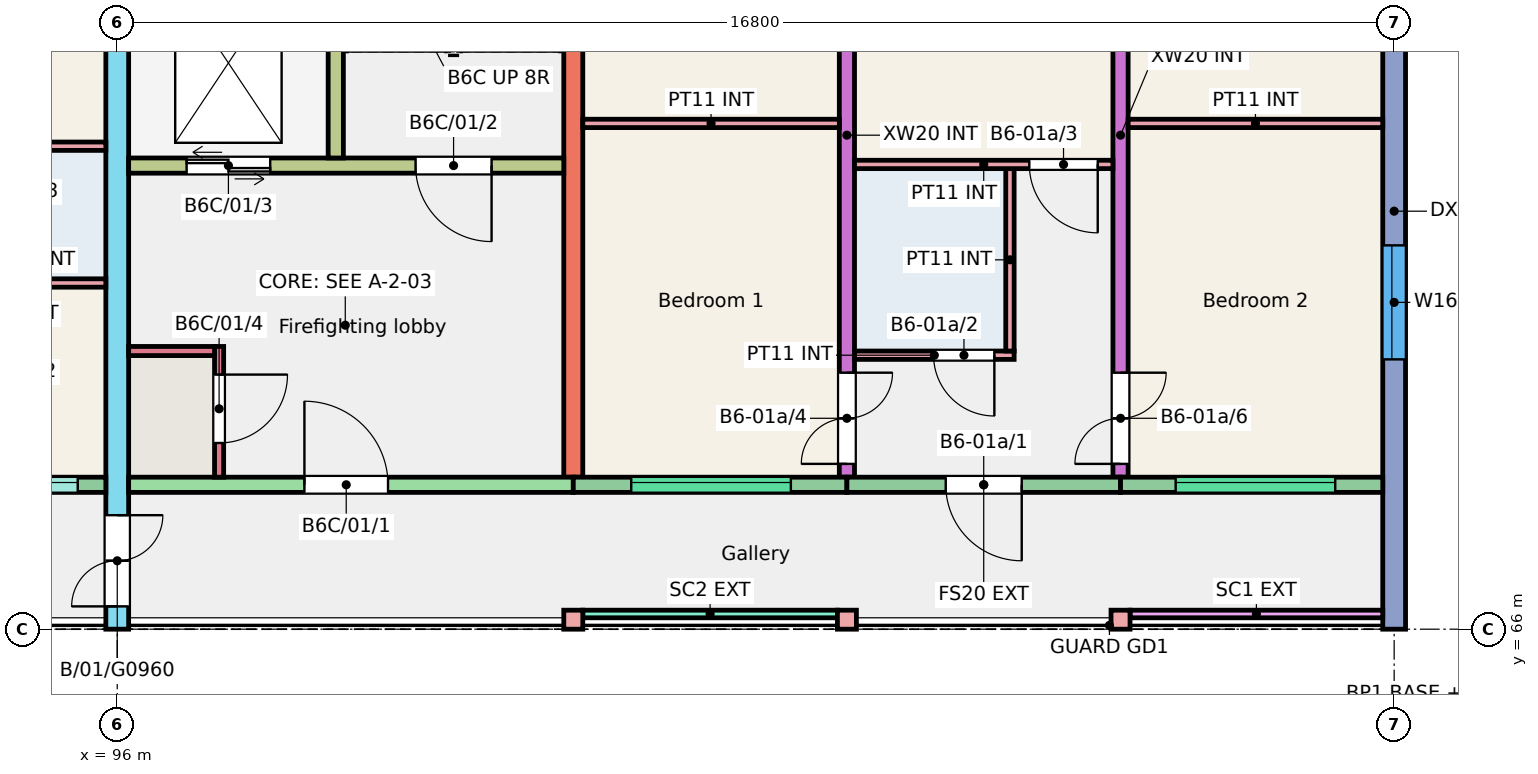
"""IFC4 building model, lengths in metres.
Left out: names, types, materials, properties, quantities, classifications, styles, units other than length and angle.
Written with IfcOpenShell. Run it as: python <this file> out.ifc"""

import sys

from ifc_helpers import new_model, si_unit, direction, frame, frame_2d, origin, origin_2d, place, context, subcontext, project, spatial, rectangle, extrude, element, fill, save


model = new_model("IFC4")
c1 = context("Model", 3, precision=1e-05, world=origin(), true_north=direction((0.0, 1.0)))
c2 = subcontext(c1, "Body", "Model", "MODEL_VIEW")
j1 = project(units=[si_unit("LENGTHUNIT", "METRE"), si_unit("PLANEANGLEUNIT", "RADIAN")], contexts=[c1])
p1 = place(None, origin())
s1 = spatial("IfcSite", under=j1, at=p1, CompositionType="ELEMENT")
p2 = place(p1, origin())
s2 = spatial("IfcBuilding", under=s1, at=p2, CompositionType="ELEMENT")
p3 = place(p2, frame((0.0, 0.0, 3.0)))
s3 = spatial("IfcBuildingStorey", under=s2, at=p3, CompositionType="ELEMENT", Elevation=3.0)
p4 = place(p3, frame((96.0, 66.0, 0.0), z_axis=(0.0, 0.0, 1.0), x_axis=(0.0, 1.0, 0.0)))
e1 = element("IfcWall", 1, at=p4, inside=s3, PredefinedType="SHEAR", context=c2, shape_type="SweptSolid", body=[
    extrude(rectangle(XDim=11.0, YDim=0.3, at=frame_2d((5.5, 0.0))), origin(), (0.0, 0.0, 1.0), 3.0),
])
p5 = place(p4, frame((0.3, 0.0, 0.0)))
e2 = element("IfcOpeningElement", 2, at=p5, cuts=e1, PredefinedType="OPENING", context=c2, shape_type="SweptSolid", body=[
    extrude(rectangle(XDim=1.2, YDim=2.1, at=frame_2d((0.6, 1.05))), frame((0.0, 0.16, 0.0), z_axis=(0.0, -1.0, 0.0), x_axis=(1.0, 0.0, 0.0)), (0.0, 0.0, 1.0), 0.32),
])
p6 = place(p3, frame((102.0, 68.0, 0.0), z_axis=(0.0, 0.0, 1.0), x_axis=(0.0, 1.0, 0.0)))
e3 = element("IfcWall", 3, at=p6, inside=s3, PredefinedType="SHEAR", context=c2, shape_type="SweptSolid", body=[
    extrude(rectangle(XDim=9.0, YDim=0.25, at=frame_2d((4.5, 0.0))), origin(), (0.0, 0.0, 1.0), 3.0),
])
p7 = place(p3, frame((105.6, 68.0, 0.0), z_axis=(0.0, 0.0, 1.0), x_axis=(0.0, 1.0, 0.0)))
e4 = element("IfcWall", 4, at=p7, inside=s3, PredefinedType="SHEAR", context=c2, shape_type="SweptSolid", body=[
    extrude(rectangle(XDim=9.0, YDim=0.2, at=frame_2d((4.5, 0.0))), origin(), (0.0, 0.0, 1.0), 3.0),
])
p8 = place(p7, frame((0.175, 0.0, 0.0)))
e5 = element("IfcOpeningElement", 5, at=p8, cuts=e4, PredefinedType="OPENING", context=c2, shape_type="SweptSolid", body=[
    extrude(rectangle(XDim=1.2, YDim=2.1, at=frame_2d((0.6, 1.05))), frame((0.0, 0.11, 0.0), z_axis=(0.0, -1.0, 0.0), x_axis=(1.0, 0.0, 0.0)), (0.0, 0.0, 1.0), 0.22),
])
p9 = place(p7, frame((6.4, 0.0, 0.0)))
e6 = element("IfcOpeningElement", 6, at=p9, cuts=e4, PredefinedType="OPENING", context=c2, shape_type="SweptSolid", body=[
    extrude(rectangle(XDim=1.2, YDim=2.1, at=frame_2d((0.6, 1.05))), frame((0.0, 0.11, 0.0), z_axis=(0.0, -1.0, 0.0), x_axis=(1.0, 0.0, 0.0)), (0.0, 0.0, 1.0), 0.22),
])
p10 = place(p3, frame((109.2, 68.0, 0.0), z_axis=(0.0, 0.0, 1.0), x_axis=(0.0, 1.0, 0.0)))
e7 = element("IfcWall", 7, at=p10, inside=s3, PredefinedType="SHEAR", context=c2, shape_type="SweptSolid", body=[
    extrude(rectangle(XDim=9.0, YDim=0.2, at=frame_2d((4.5, 0.0))), origin(), (0.0, 0.0, 1.0), 3.0),
])
p11 = place(p10, frame((0.175, 0.0, 0.0)))
e8 = element("IfcOpeningElement", 8, at=p11, cuts=e7, PredefinedType="OPENING", context=c2, shape_type="SweptSolid", body=[
    extrude(rectangle(XDim=1.2, YDim=2.1, at=frame_2d((0.6, 1.05))), frame((0.0, 0.11, 0.0), z_axis=(0.0, -1.0, 0.0), x_axis=(1.0, 0.0, 0.0)), (0.0, 0.0, 1.0), 0.22),
])
p12 = place(p10, frame((6.4, 0.0, 0.0)))
e9 = element("IfcOpeningElement", 9, at=p12, cuts=e7, PredefinedType="OPENING", context=c2, shape_type="SweptSolid", body=[
    extrude(rectangle(XDim=1.2, YDim=2.1, at=frame_2d((0.6, 1.05))), frame((0.0, 0.11, 0.0), z_axis=(0.0, -1.0, 0.0), x_axis=(1.0, 0.0, 0.0)), (0.0, 0.0, 1.0), 0.22),
])
p13 = place(p3, frame((112.8, 66.0, 0.0), z_axis=(0.0, 0.0, 1.0), x_axis=(0.0, 1.0, 0.0)))
e10 = element("IfcWall", 10, at=p13, inside=s3, PredefinedType="SHEAR", context=c2, shape_type="SweptSolid", body=[
    extrude(rectangle(XDim=11.0, YDim=0.3, at=frame_2d((5.5, 0.0))), origin(), (0.0, 0.0, 1.0), 3.0),
])
p14 = place(p13, frame((3.55, 0.0, 0.9)))
e11 = element("IfcOpeningElement", 11, at=p14, cuts=e10, PredefinedType="OPENING", context=c2, shape_type="SweptSolid", body=[
    extrude(rectangle(XDim=1.5, YDim=1.5, at=frame_2d((0.75, 0.75))), frame((0.0, 0.16, 0.0), z_axis=(0.0, -1.0, 0.0), x_axis=(1.0, 0.0, 0.0)), (0.0, 0.0, 1.0), 0.32),
])
p15 = place(p13, frame((8.105, 0.0, 0.9)))
e12 = element("IfcOpeningElement", 12, at=p15, cuts=e10, PredefinedType="OPENING", context=c2, shape_type="SweptSolid", body=[
    extrude(rectangle(XDim=1.5, YDim=1.5, at=frame_2d((0.75, 0.75))), frame((0.0, 0.16, 0.0), z_axis=(0.0, -1.0, 0.0), x_axis=(1.0, 0.0, 0.0)), (0.0, 0.0, 1.0), 0.32),
])
p16 = place(p3, frame((92.4, 67.9, 0.0), z_axis=(0.0, 0.0, 1.0), x_axis=(1.0, 0.0, 0.0)))
e13 = element("IfcWall", 13, at=p16, inside=s3, PredefinedType="SOLIDWALL", context=c2, shape_type="SweptSolid", body=[
    extrude(rectangle(XDim=3.45, YDim=0.2, at=frame_2d((1.725, 0.0))), origin(), (0.0, 0.0, 1.0), 3.0),
])
p17 = place(p16, frame((1.88, 0.0, 1.1)))
e14 = element("IfcOpeningElement", 14, at=p17, cuts=e13, PredefinedType="OPENING", context=c2, shape_type="SweptSolid", body=[
    extrude(rectangle(XDim=1.2, YDim=1.3, at=frame_2d((0.6, 0.65))), frame((0.0, 0.11, 0.0), z_axis=(0.0, -1.0, 0.0), x_axis=(1.0, 0.0, 0.0)), (0.0, 0.0, 1.0), 0.22),
])
p18 = place(p16, frame((0.25, 0.0, 0.0)))
e15 = element("IfcOpeningElement", 15, at=p18, cuts=e13, PredefinedType="OPENING", context=c2, shape_type="SweptSolid", body=[
    extrude(rectangle(XDim=1.0, YDim=2.1, at=frame_2d((0.5, 1.05))), frame((0.0, 0.11, 0.0), z_axis=(0.0, -1.0, 0.0), x_axis=(1.0, 0.0, 0.0)), (0.0, 0.0, 1.0), 0.22),
])
p19 = place(p3, frame((96.15, 67.9, 0.0), z_axis=(0.0, 0.0, 1.0), x_axis=(1.0, 0.0, 0.0)))
e16 = element("IfcWall", 16, at=p19, inside=s3, PredefinedType="SHEAR", context=c2, shape_type="SweptSolid", body=[
    extrude(rectangle(XDim=5.85, YDim=0.2, at=frame_2d((2.925, 0.0))), origin(), (0.0, 0.0, 1.0), 3.0),
])
p20 = place(p19, frame((2.312, 0.0, 0.0)))
e17 = element("IfcOpeningElement", 17, at=p20, cuts=e16, PredefinedType="OPENING", context=c2, shape_type="SweptSolid", body=[
    extrude(rectangle(XDim=1.1, YDim=2.1, at=frame_2d((0.55, 1.05))), frame((0.0, 0.11, 0.0), z_axis=(0.0, -1.0, 0.0), x_axis=(1.0, 0.0, 0.0)), (0.0, 0.0, 1.0), 0.22),
])
p21 = place(p3, frame((96.15, 72.1, 0.0), z_axis=(0.0, 0.0, 1.0), x_axis=(1.0, 0.0, 0.0)))
e18 = element("IfcWall", 18, at=p21, inside=s3, PredefinedType="SHEAR", context=c2, shape_type="SweptSolid", body=[
    extrude(rectangle(XDim=5.725, YDim=0.2, at=frame_2d((2.863, 0.0))), origin(), (0.0, 0.0, 1.0), 3.0),
])
p22 = place(p21, frame((3.775, 0.0, 0.0)))
e19 = element("IfcOpeningElement", 19, at=p22, cuts=e18, PredefinedType="OPENING", context=c2, shape_type="SweptSolid", body=[
    extrude(rectangle(XDim=1.0, YDim=2.1, at=frame_2d((0.5, 1.05))), frame((0.0, 0.11, 0.0), z_axis=(0.0, -1.0, 0.0), x_axis=(1.0, 0.0, 0.0)), (0.0, 0.0, 1.0), 0.22),
])
p23 = place(p21, frame((0.762, 0.0, 0.0)))
e20 = element("IfcOpeningElement", 20, at=p23, cuts=e18, PredefinedType="OPENING", context=c2, shape_type="SweptSolid", body=[
    extrude(rectangle(XDim=1.1, YDim=2.1, at=frame_2d((0.55, 1.05))), frame((0.0, 0.11, 0.0), z_axis=(0.0, -1.0, 0.0), x_axis=(1.0, 0.0, 0.0)), (0.0, 0.0, 1.0), 0.22),
])
p24 = place(p3, frame((98.875, 72.2, 0.0), z_axis=(0.0, 0.0, 1.0), x_axis=(0.0, 1.0, 0.0)))
e21 = element("IfcWall", 21, at=p24, inside=s3, PredefinedType="SHEAR", context=c2, shape_type="SweptSolid", body=[
    extrude(rectangle(XDim=4.8, YDim=0.2, at=frame_2d((2.4, 0.0))), origin(), (0.0, 0.0, 1.0), 3.0),
])
p25 = place(p3, frame((97.34, 68.0, 0.0), z_axis=(0.0, 0.0, 1.0), x_axis=(0.0, 1.0, 0.0)))
e22 = element("IfcWall", 22, at=p25, inside=s3, PredefinedType="SHEAR", context=c2, shape_type="SweptSolid", body=[
    extrude(rectangle(XDim=1.72, YDim=0.12, at=frame_2d((0.86, 0.0))), origin(), (0.0, 0.0, 1.0), 3.0),
])
p26 = place(p25, frame((0.45, 0.0, 0.0)))
e23 = element("IfcOpeningElement", 23, at=p26, cuts=e22, PredefinedType="OPENING", context=c2, shape_type="SweptSolid", body=[
    extrude(rectangle(XDim=0.9, YDim=2.1, at=frame_2d((0.45, 1.05))), frame((0.0, 0.07, 0.0), z_axis=(0.0, -1.0, 0.0), x_axis=(1.0, 0.0, 0.0)), (0.0, 0.0, 1.0), 0.14),
])
p27 = place(p3, frame((96.15, 69.66, 0.0), z_axis=(0.0, 0.0, 1.0), x_axis=(1.0, 0.0, 0.0)))
e24 = element("IfcWall", 24, at=p27, inside=s3, PredefinedType="SHEAR", context=c2, shape_type="SweptSolid", body=[
    extrude(rectangle(XDim=1.13, YDim=0.12, at=frame_2d((0.565, 0.0))), origin(), (0.0, 0.0, 1.0), 3.0),
])
p28 = place(p3, frame((102.0, 67.9, 0.0), z_axis=(0.0, 0.0, 1.0), x_axis=(1.0, 0.0, 0.0)))
e25 = element("IfcWall", 25, at=p28, inside=s3, PredefinedType="SOLIDWALL", context=c2, shape_type="SweptSolid", body=[
    extrude(rectangle(XDim=3.6, YDim=0.2, at=frame_2d((1.8, 0.0))), origin(), (0.0, 0.0, 1.0), 3.0),
])
p29 = place(p28, frame((0.762, 0.0, 1.2)))
e26 = element("IfcOpeningElement", 26, at=p29, cuts=e25, PredefinedType="OPENING", context=c2, shape_type="SweptSolid", body=[
    extrude(rectangle(XDim=2.1, YDim=1.2, at=frame_2d((1.05, 0.6))), frame((0.0, 0.11, 0.0), z_axis=(0.0, -1.0, 0.0), x_axis=(1.0, 0.0, 0.0)), (0.0, 0.0, 1.0), 0.22),
])
p30 = place(p3, frame((105.6, 67.9, 0.0), z_axis=(0.0, 0.0, 1.0), x_axis=(1.0, 0.0, 0.0)))
e27 = element("IfcWall", 27, at=p30, inside=s3, PredefinedType="SOLIDWALL", context=c2, shape_type="SweptSolid", body=[
    extrude(rectangle(XDim=3.6, YDim=0.2, at=frame_2d((1.8, 0.0))), origin(), (0.0, 0.0, 1.0), 3.0),
])
p31 = place(p30, frame((1.3, 0.0, 0.0)))
e28 = element("IfcOpeningElement", 28, at=p31, cuts=e27, PredefinedType="OPENING", context=c2, shape_type="SweptSolid", body=[
    extrude(rectangle(XDim=1.0, YDim=2.1, at=frame_2d((0.5, 1.05))), frame((0.0, 0.11, 0.0), z_axis=(0.0, -1.0, 0.0), x_axis=(1.0, 0.0, 0.0)), (0.0, 0.0, 1.0), 0.22),
])
p32 = place(p3, frame((109.2, 67.9, 0.0), z_axis=(0.0, 0.0, 1.0), x_axis=(1.0, 0.0, 0.0)))
e29 = element("IfcWall", 29, at=p32, inside=s3, PredefinedType="SOLIDWALL", context=c2, shape_type="SweptSolid", body=[
    extrude(rectangle(XDim=3.45, YDim=0.2, at=frame_2d((1.725, 0.0))), origin(), (0.0, 0.0, 1.0), 3.0),
])
p33 = place(p32, frame((0.725, 0.0, 1.2)))
e30 = element("IfcOpeningElement", 30, at=p33, cuts=e29, PredefinedType="OPENING", context=c2, shape_type="SweptSolid", body=[
    extrude(rectangle(XDim=2.1, YDim=1.2, at=frame_2d((1.05, 0.6))), frame((0.0, 0.11, 0.0), z_axis=(0.0, -1.0, 0.0), x_axis=(1.0, 0.0, 0.0)), (0.0, 0.0, 1.0), 0.22),
])
for number, where, z_axis, x_axis in (
    (31, (102.0, 66.125, 0.0), (0.0, 0.0, 1.0), (1.0, 0.0, 0.0)),
    (32, (105.6, 66.125, 0.0), (0.0, 0.0, 1.0), (1.0, 0.0, 0.0)),
    (33, (109.2, 66.125, 0.0), (0.0, 0.0, 1.0), (1.0, 0.0, 0.0)),
):
    element("IfcColumn", number, at=place(p3, frame(where, z_axis=z_axis, x_axis=x_axis)), inside=s3, PredefinedType="COLUMN", context=c2, shape_type="SweptSolid", body=[
        extrude(rectangle(XDim=0.25, YDim=0.25, at=origin_2d()), origin(), (0.0, 0.0, 1.0), 3.0),
    ])
p34 = place(p3, frame((102.125, 66.2, 0.0), z_axis=(0.0, 0.0, 1.0), x_axis=(1.0, 0.0, 0.0)))
e34 = element("IfcWall", 34, at=p34, inside=s3, PredefinedType="SOLIDWALL", context=c2, shape_type="SweptSolid", body=[
    extrude(rectangle(XDim=3.35, YDim=0.1, at=frame_2d((1.675, 0.0))), origin(), (0.0, 0.0, 1.0), 2.45),
])
p35 = place(p3, frame((109.325, 66.2, 0.0), z_axis=(0.0, 0.0, 1.0), x_axis=(1.0, 0.0, 0.0)))
e35 = element("IfcWall", 35, at=p35, inside=s3, PredefinedType="SOLIDWALL", context=c2, shape_type="SweptSolid", body=[
    extrude(rectangle(XDim=3.325, YDim=0.1, at=frame_2d((1.663, 0.0))), origin(), (0.0, 0.0, 1.0), 2.45),
])
p36 = place(p3, frame((93.91, 70.555, 0.0), z_axis=(0.0, 0.0, 1.0), x_axis=(1.0, 0.0, 0.0)))
e36 = element("IfcWall", 36, at=p36, inside=s3, PredefinedType="PARTITIONING", context=c2, shape_type="SweptSolid", body=[
    extrude(rectangle(XDim=1.94, YDim=0.11, at=frame_2d((0.97, 0.0))), origin(), (0.0, 0.0, 1.0), 2.8),
])
p37 = place(p3, frame((92.5, 72.355, 0.0), z_axis=(0.0, 0.0, 1.0), x_axis=(1.0, 0.0, 0.0)))
e37 = element("IfcWall", 37, at=p37, inside=s3, PredefinedType="PARTITIONING", context=c2, shape_type="SweptSolid", body=[
    extrude(rectangle(XDim=3.35, YDim=0.11, at=frame_2d((1.675, 0.0))), origin(), (0.0, 0.0, 1.0), 2.8),
])
p38 = place(p37, frame((0.2, 0.0, 0.0)))
e38 = element("IfcOpeningElement", 38, at=p38, cuts=e37, PredefinedType="OPENING", context=c2, shape_type="SweptSolid", body=[
    extrude(rectangle(XDim=0.9, YDim=2.1, at=frame_2d((0.45, 1.05))), frame((0.0, 0.065, 0.0), z_axis=(0.0, -1.0, 0.0), x_axis=(1.0, 0.0, 0.0)), (0.0, 0.0, 1.0), 0.13),
])
p39 = place(p3, frame((105.7, 69.605, 0.0), z_axis=(0.0, 0.0, 1.0), x_axis=(1.0, 0.0, 0.0)))
e39 = element("IfcWall", 39, at=p39, inside=s3, PredefinedType="PARTITIONING", context=c2, shape_type="SweptSolid", body=[
    extrude(rectangle(XDim=2.1, YDim=0.11, at=frame_2d((1.05, 0.0))), origin(), (0.0, 0.0, 1.0), 2.8),
])
p40 = place(p39, frame((1.04, 0.0, 0.0)))
e40 = element("IfcOpeningElement", 40, at=p40, cuts=e39, PredefinedType="OPENING", context=c2, shape_type="SweptSolid", body=[
    extrude(rectangle(XDim=0.8, YDim=2.1, at=frame_2d((0.4, 1.05))), frame((0.0, 0.065, 0.0), z_axis=(0.0, -1.0, 0.0), x_axis=(1.0, 0.0, 0.0)), (0.0, 0.0, 1.0), 0.13),
])
p41 = place(p3, frame((107.745, 69.66, 0.0), z_axis=(0.0, 0.0, 1.0), x_axis=(0.0, 1.0, 0.0)))
e41 = element("IfcWall", 41, at=p41, inside=s3, PredefinedType="PARTITIONING", context=c2, shape_type="SweptSolid", body=[
    extrude(rectangle(XDim=2.4, YDim=0.11, at=frame_2d((1.2, 0.0))), origin(), (0.0, 0.0, 1.0), 2.8),
])
p42 = place(p3, frame((105.7, 72.115, 0.0), z_axis=(0.0, 0.0, 1.0), x_axis=(1.0, 0.0, 0.0)))
e42 = element("IfcWall", 42, at=p42, inside=s3, PredefinedType="PARTITIONING", context=c2, shape_type="SweptSolid", body=[
    extrude(rectangle(XDim=3.4, YDim=0.11, at=frame_2d((1.7, 0.0))), origin(), (0.0, 0.0, 1.0), 2.8),
])
p43 = place(p42, frame((2.3, 0.0, 0.0)))
e43 = element("IfcOpeningElement", 43, at=p43, cuts=e42, PredefinedType="OPENING", context=c2, shape_type="SweptSolid", body=[
    extrude(rectangle(XDim=0.9, YDim=2.1, at=frame_2d((0.45, 1.05))), frame((0.0, 0.065, 0.0), z_axis=(0.0, -1.0, 0.0), x_axis=(1.0, 0.0, 0.0)), (0.0, 0.0, 1.0), 0.13),
])
p44 = place(p3, frame((102.125, 72.655, 0.0), z_axis=(0.0, 0.0, 1.0), x_axis=(1.0, 0.0, 0.0)))
e44 = element("IfcWall", 44, at=p44, inside=s3, PredefinedType="PARTITIONING", context=c2, shape_type="SweptSolid", body=[
    extrude(rectangle(XDim=3.375, YDim=0.11, at=frame_2d((1.688, 0.0))), origin(), (0.0, 0.0, 1.0), 2.8),
])
p45 = place(p3, frame((109.3, 72.655, 0.0), z_axis=(0.0, 0.0, 1.0), x_axis=(1.0, 0.0, 0.0)))
e45 = element("IfcWall", 45, at=p45, inside=s3, PredefinedType="PARTITIONING", context=c2, shape_type="SweptSolid", body=[
    extrude(rectangle(XDim=3.35, YDim=0.11, at=frame_2d((1.675, 0.0))), origin(), (0.0, 0.0, 1.0), 2.8),
])
p46 = place(p17, origin())
e46 = element("IfcWindow", 46, at=p46, inside=s3, PartitioningType="SINGLE_PANEL", PredefinedType="WINDOW", context=c2, shape_type="SweptSolid", body=[
    extrude(rectangle(XDim=1.2, YDim=1.3, at=frame_2d((0.6, 0.65))), frame((0.0, 0.06, 0.0), z_axis=(0.0, -1.0, 0.0), x_axis=(1.0, 0.0, 0.0)), (0.0, 0.0, 1.0), 0.06),
])
fill(e14, e46)
p47 = place(p29, origin())
e47 = element("IfcWindow", 47, at=p47, inside=s3, PartitioningType="SINGLE_PANEL", PredefinedType="WINDOW", context=c2, shape_type="SweptSolid", body=[
    extrude(rectangle(XDim=2.1, YDim=1.2, at=frame_2d((1.05, 0.6))), frame((0.0, 0.06, 0.0), z_axis=(0.0, -1.0, 0.0), x_axis=(1.0, 0.0, 0.0)), (0.0, 0.0, 1.0), 0.06),
])
fill(e26, e47)
p48 = place(p33, origin())
e48 = element("IfcWindow", 48, at=p48, inside=s3, PartitioningType="SINGLE_PANEL", PredefinedType="WINDOW", context=c2, shape_type="SweptSolid", body=[
    extrude(rectangle(XDim=2.1, YDim=1.2, at=frame_2d((1.05, 0.6))), frame((0.0, 0.06, 0.0), z_axis=(0.0, -1.0, 0.0), x_axis=(1.0, 0.0, 0.0)), (0.0, 0.0, 1.0), 0.06),
])
fill(e30, e48)
p49 = place(p14, origin())
e49 = element("IfcWindow", 49, at=p49, inside=s3, PartitioningType="SINGLE_PANEL", PredefinedType="WINDOW", context=c2, shape_type="SweptSolid", body=[
    extrude(rectangle(XDim=1.5, YDim=1.5, at=frame_2d((0.75, 0.75))), frame((0.0, 0.06, 0.0), z_axis=(0.0, -1.0, 0.0), x_axis=(1.0, 0.0, 0.0)), (0.0, 0.0, 1.0), 0.06),
])
fill(e11, e49)
p50 = place(p31, origin())
e50 = element("IfcDoor", 50, at=p50, inside=s3, OperationType="SINGLE_SWING_RIGHT", PredefinedType="DOOR", context=c2, shape_type="SweptSolid", body=[
    extrude(rectangle(XDim=1.0, YDim=2.1, at=frame_2d((0.5, 1.05))), frame((0.0, 0.025, 0.0), z_axis=(0.0, -1.0, 0.0), x_axis=(1.0, 0.0, 0.0)), (0.0, 0.0, 1.0), 0.05),
])
fill(e28, e50)
p51 = place(p40, origin())
e51 = element("IfcDoor", 51, at=p51, inside=s3, OperationType="SINGLE_SWING_RIGHT", PredefinedType="DOOR", context=c2, shape_type="SweptSolid", body=[
    extrude(rectangle(XDim=0.8, YDim=2.1, at=frame_2d((0.4, 1.05))), frame((0.0, 0.025, 0.0), z_axis=(0.0, -1.0, 0.0), x_axis=(1.0, 0.0, 0.0)), (0.0, 0.0, 1.0), 0.05),
])
fill(e40, e51)
p52 = place(p43, origin())
e52 = element("IfcDoor", 52, at=p52, inside=s3, OperationType="SINGLE_SWING_RIGHT", PredefinedType="DOOR", context=c2, shape_type="SweptSolid", body=[
    extrude(rectangle(XDim=0.9, YDim=2.1, at=frame_2d((0.45, 1.05))), frame((0.0, 0.025, 0.0), z_axis=(0.0, -1.0, 0.0), x_axis=(1.0, 0.0, 0.0)), (0.0, 0.0, 1.0), 0.05),
])
fill(e43, e52)
p53 = place(p8, origin())
e53 = element("IfcDoor", 53, at=p53, inside=s3, OperationType="DOUBLE_DOOR_SINGLE_SWING", PredefinedType="DOOR", context=c2, shape_type="SweptSolid", body=[
    extrude(rectangle(XDim=1.2, YDim=2.1, at=frame_2d((0.6, 1.05))), frame((0.0, 0.025, 0.0), z_axis=(0.0, -1.0, 0.0), x_axis=(1.0, 0.0, 0.0)), (0.0, 0.0, 1.0), 0.05),
])
fill(e5, e53)
p54 = place(p11, origin())
e54 = element("IfcDoor", 54, at=p54, inside=s3, OperationType="DOUBLE_DOOR_SINGLE_SWING", PredefinedType="DOOR", context=c2, shape_type="SweptSolid", body=[
    extrude(rectangle(XDim=1.2, YDim=2.1, at=frame_2d((0.6, 1.05))), frame((0.0, 0.025, 0.0), z_axis=(0.0, -1.0, 0.0), x_axis=(1.0, 0.0, 0.0)), (0.0, 0.0, 1.0), 0.05),
])
fill(e8, e54)
p55 = place(p20, origin())
e55 = element("IfcDoor", 55, at=p55, inside=s3, OperationType="SINGLE_SWING_LEFT", PredefinedType="DOOR", context=c2, shape_type="SweptSolid", body=[
    extrude(rectangle(XDim=1.1, YDim=2.1, at=frame_2d((0.55, 1.05))), frame((0.0, 0.025, 0.0), z_axis=(0.0, -1.0, 0.0), x_axis=(1.0, 0.0, 0.0)), (0.0, 0.0, 1.0), 0.05),
])
fill(e17, e55)
p56 = place(p22, origin())
e56 = element("IfcDoor", 56, at=p56, inside=s3, OperationType="SINGLE_SWING_RIGHT", PredefinedType="DOOR", context=c2, shape_type="SweptSolid", body=[
    extrude(rectangle(XDim=1.0, YDim=2.1, at=frame_2d((0.5, 1.05))), frame((0.0, 0.025, 0.0), z_axis=(0.0, -1.0, 0.0), x_axis=(1.0, 0.0, 0.0)), (0.0, 0.0, 1.0), 0.05),
])
fill(e19, e56)
p57 = place(p23, origin())
e57 = element("IfcDoor", 57, at=p57, inside=s3, OperationType="DOUBLE_DOOR_SLIDING", PredefinedType="DOOR", context=c2, shape_type="SweptSolid", body=[
    extrude(rectangle(XDim=1.1, YDim=2.1, at=frame_2d((0.55, 1.05))), frame((0.0, 0.025, 0.0), z_axis=(0.0, -1.0, 0.0), x_axis=(1.0, 0.0, 0.0)), (0.0, 0.0, 1.0), 0.05),
])
fill(e20, e57)
p58 = place(p26, origin())
e58 = element("IfcDoor", 58, at=p58, inside=s3, OperationType="SINGLE_SWING_RIGHT", PredefinedType="DOOR", context=c2, shape_type="SweptSolid", body=[
    extrude(rectangle(XDim=0.9, YDim=2.1, at=frame_2d((0.45, 1.05))), frame((0.0, 0.025, 0.0), z_axis=(0.0, -1.0, 0.0), x_axis=(1.0, 0.0, 0.0)), (0.0, 0.0, 1.0), 0.05),
])
fill(e23, e58)
p59 = place(p5, origin())
e59 = element("IfcDoor", 59, at=p59, inside=s3, OperationType="DOUBLE_DOOR_SINGLE_SWING", PredefinedType="DOOR", context=c2, shape_type="SweptSolid", body=[
    extrude(rectangle(XDim=1.2, YDim=2.1, at=frame_2d((0.6, 1.05))), frame((0.0, 0.025, 0.0), z_axis=(0.0, -1.0, 0.0), x_axis=(1.0, 0.0, 0.0)), (0.0, 0.0, 1.0), 0.05),
])
fill(e2, e59)
save(model, sys.argv[1])
